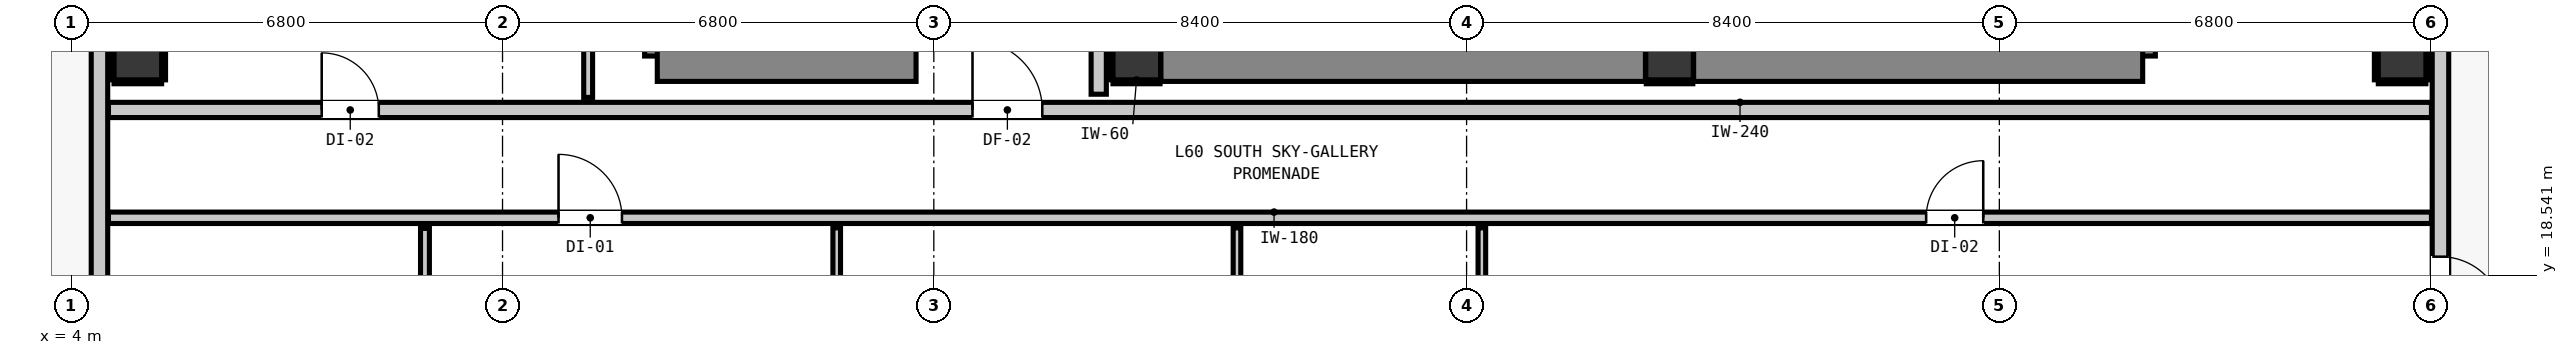
"""IFC4 building model, lengths in metres.
Left out: names, types, materials, properties, quantities, classifications, styles, units other than length and angle.
Written with IfcOpenShell. Run it as: python <this file> out.ifc"""

import sys

from ifc_helpers import new_model, si_unit, direction, frame, frame_2d, origin, origin_2d, place, context, subcontext, project, spatial, rectangle, extrude, element, fill, save


model = new_model("IFC4")
c1 = context("Model", 3, precision=1e-05, world=origin(), true_north=direction((0.0, 1.0)))
c2 = subcontext(c1, "Body", "Model", "MODEL_VIEW")
j1 = project(units=[si_unit("LENGTHUNIT", "METRE"), si_unit("PLANEANGLEUNIT", "RADIAN")], contexts=[c1])
p1 = place(None, origin())
s1 = spatial("IfcSite", under=j1, at=p1, CompositionType="ELEMENT")
p2 = place(p1, origin())
s2 = spatial("IfcBuilding", under=s1, at=p2, CompositionType="ELEMENT")
p3 = place(p2, frame((0.0, 0.0, 206.76)))
s3 = spatial("IfcBuildingStorey", under=s2, at=p3, CompositionType="ELEMENT", Elevation=206.76)
for number, where, z_axis, x_axis in (
    (1, (20.8, 22.0, 0.0), (0.0, 0.0, 1.0), (1.0, 0.0, 0.0)),
    (2, (29.2, 22.0, 0.0), (0.0, 0.0, 1.0), (1.0, 0.0, 0.0)),
):
    element("IfcColumn", number, at=place(p3, frame(where, z_axis=z_axis, x_axis=x_axis)), inside=s3, PredefinedType="COLUMN", context=c2, shape_type="SweptSolid", body=[
        extrude(rectangle(XDim=0.75, YDim=0.75, at=origin_2d()), origin(), (0.0, 0.0, 1.0), 3.32),
    ])
p4 = place(p3, frame((13.44, 22.0, 0.0), z_axis=(0.0, 0.0, 1.0), x_axis=(0.0, 1.0, 0.0)))
e3 = element("IfcWall", 3, at=p4, inside=s3, PredefinedType="SHEAR", context=c2, shape_type="SweptSolid", body=[
    extrude(rectangle(XDim=8.32, YDim=0.8, at=frame_2d((4.16, 0.0))), origin(), (0.0, 0.0, 1.0), 3.32),
])
p5 = place(p3, frame((13.24, 22.0, 0.0), z_axis=(0.0, 0.0, 1.0), x_axis=(1.0, 0.0, 0.0)))
e4 = element("IfcWall", 4, at=p5, inside=s3, PredefinedType="SHEAR", context=c2, shape_type="SweptSolid", body=[
    extrude(rectangle(XDim=4.08, YDim=0.8, at=frame_2d((2.04, 0.0))), origin(), (0.0, 0.0, 1.0), 3.32),
])
p6 = place(p3, frame((36.46, 22.0, 0.0), z_axis=(0.0, 0.0, 1.0), x_axis=(0.0, 1.0, 0.0)))
e5 = element("IfcWall", 5, at=p6, inside=s3, PredefinedType="SHEAR", context=c2, shape_type="SweptSolid", body=[
    extrude(rectangle(XDim=8.32, YDim=0.8, at=frame_2d((4.16, 0.0))), origin(), (0.0, 0.0, 1.0), 3.32),
])
p7 = place(p3, frame((29.58, 22.0, 0.0), z_axis=(0.0, 0.0, 1.0), x_axis=(1.0, 0.0, 0.0)))
e6 = element("IfcWall", 6, at=p7, inside=s3, PredefinedType="SHEAR", context=c2, shape_type="SweptSolid", body=[
    extrude(rectangle(XDim=7.08, YDim=0.8, at=frame_2d((3.54, 0.0))), origin(), (0.0, 0.0, 1.0), 3.32),
])
p8 = place(p3, frame((21.18, 22.0, 0.0), z_axis=(0.0, 0.0, 1.0), x_axis=(1.0, 0.0, 0.0)))
e7 = element("IfcWall", 7, at=p8, inside=s3, PredefinedType="SHEAR", context=c2, shape_type="SweptSolid", body=[
    extrude(rectangle(XDim=7.64, YDim=0.8, at=frame_2d((3.82, 0.0))), origin(), (0.0, 0.0, 1.0), 3.32),
])
for number, where, z_axis, x_axis in (
    (8, (5.05, 22.0, 0.0), (0.0, 0.0, 1.0), (1.0, 0.0, 0.0)),
    (9, (40.75, 22.0, 0.0), (0.0, 0.0, 1.0), (1.0, 0.0, 0.0)),
):
    element("IfcColumn", number, at=place(p3, frame(where, z_axis=z_axis, x_axis=x_axis)), inside=s3, PredefinedType="COLUMN", context=c2, shape_type="SweptSolid", body=[
        extrude(rectangle(XDim=0.75, YDim=0.75, at=origin_2d()), origin(), (0.0, 0.0, 1.0), 2.9),
    ])
p9 = place(p3, frame((4.445, 12.345, 0.0), z_axis=(0.0, 0.0, 1.0), x_axis=(0.0, 1.0, 0.0)))
e10 = element("IfcWall", 10, at=p9, inside=s3, PredefinedType="STANDARD", context=c2, shape_type="SweptSolid", body=[
    extrude(rectangle(XDim=30.31, YDim=0.26, at=frame_2d((15.155, 0.0))), origin(), (0.0, 0.0, 1.0), 2.9),
])
p10 = place(p9, frame((0.91, 0.0, 0.0)))
e11 = element("IfcOpeningElement", 11, at=p10, cuts=e10, PredefinedType="OPENING", context=c2, shape_type="SweptSolid", body=[
    extrude(rectangle(XDim=1.0, YDim=2.15, at=frame_2d((0.5, 1.075))), frame((0.0, 0.14, 0.0), z_axis=(0.0, -1.0, 0.0), x_axis=(1.0, 0.0, 0.0)), (0.0, 0.0, 1.0), 0.28),
])
p11 = place(p9, frame((2.322, 0.0, 0.85)))
e12 = element("IfcOpeningElement", 12, at=p11, cuts=e10, PredefinedType="OPENING", context=c2, shape_type="SweptSolid", body=[
    extrude(rectangle(XDim=0.58, YDim=1.5, at=frame_2d((0.29, 0.75))), frame((0.0, 0.14, 0.0), z_axis=(0.0, -1.0, 0.0), x_axis=(1.0, 0.0, 0.0)), (0.0, 0.0, 1.0), 0.28),
])
p12 = place(p9, frame((13.255, 0.0, 0.85)))
e13 = element("IfcOpeningElement", 13, at=p12, cuts=e10, PredefinedType="OPENING", context=c2, shape_type="SweptSolid", body=[
    extrude(rectangle(XDim=1.5, YDim=1.8, at=frame_2d((0.75, 0.9))), frame((0.0, 0.14, 0.0), z_axis=(0.0, -1.0, 0.0), x_axis=(1.0, 0.0, 0.0)), (0.0, 0.0, 1.0), 0.28),
])
p13 = place(p3, frame((41.355, 42.655, 0.0), z_axis=(0.0, 0.0, 1.0), x_axis=(0.0, -1.0, 0.0)))
e14 = element("IfcWall", 14, at=p13, inside=s3, PredefinedType="STANDARD", context=c2, shape_type="SweptSolid", body=[
    extrude(rectangle(XDim=30.31, YDim=0.26, at=frame_2d((15.155, 0.0))), origin(), (0.0, 0.0, 1.0), 2.9),
])
p14 = place(p13, frame((23.818, 0.0, 0.0)))
e15 = element("IfcOpeningElement", 15, at=p14, cuts=e14, PredefinedType="OPENING", context=c2, shape_type="SweptSolid", body=[
    extrude(rectangle(XDim=1.0, YDim=2.15, at=frame_2d((0.5, 1.075))), frame((0.0, 0.14, 0.0), z_axis=(0.0, -1.0, 0.0), x_axis=(1.0, 0.0, 0.0)), (0.0, 0.0, 1.0), 0.28),
])
p15 = place(p13, frame((26.869, 0.0, 0.85)))
e16 = element("IfcOpeningElement", 16, at=p15, cuts=e14, PredefinedType="OPENING", context=c2, shape_type="SweptSolid", body=[
    extrude(rectangle(XDim=1.5, YDim=1.8, at=frame_2d((0.75, 0.9))), frame((0.0, 0.14, 0.0), z_axis=(0.0, -1.0, 0.0), x_axis=(1.0, 0.0, 0.0)), (0.0, 0.0, 1.0), 0.28),
])
p16 = place(p3, frame((4.587, 21.15, 0.0), z_axis=(0.0, 0.0, 1.0), x_axis=(1.0, 0.0, 0.0)))
e17 = element("IfcWall", 17, at=p16, inside=s3, PredefinedType="PARTITIONING", context=c2, shape_type="SweptSolid", body=[
    extrude(rectangle(XDim=36.626, YDim=0.24, at=frame_2d((18.313, 0.0))), origin(), (0.0, 0.0, 1.0), 2.9),
])
p17 = place(p16, frame((13.623, 0.0, 0.0)))
e18 = element("IfcOpeningElement", 18, at=p17, cuts=e17, PredefinedType="OPENING", context=c2, shape_type="SweptSolid", body=[
    extrude(rectangle(XDim=1.1, YDim=2.15, at=frame_2d((0.55, 1.075))), frame((0.0, 0.13, 0.0), z_axis=(0.0, -1.0, 0.0), x_axis=(1.0, 0.0, 0.0)), (0.0, 0.0, 1.0), 0.26),
])
p18 = place(p16, frame((3.362, 0.0, 0.0)))
e19 = element("IfcOpeningElement", 19, at=p18, cuts=e17, PredefinedType="OPENING", context=c2, shape_type="SweptSolid", body=[
    extrude(rectangle(XDim=0.9, YDim=2.1, at=frame_2d((0.45, 1.05))), frame((0.0, 0.13, 0.0), z_axis=(0.0, -1.0, 0.0), x_axis=(1.0, 0.0, 0.0)), (0.0, 0.0, 1.0), 0.26),
])
p19 = place(p3, frame((4.587, 19.45, 0.0), z_axis=(0.0, 0.0, 1.0), x_axis=(1.0, 0.0, 0.0)))
e20 = element("IfcWall", 20, at=p19, inside=s3, PredefinedType="PARTITIONING", context=c2, shape_type="SweptSolid", body=[
    extrude(rectangle(XDim=36.626, YDim=0.18, at=frame_2d((18.313, 0.0))), origin(), (0.0, 0.0, 1.0), 2.9),
])
p20 = place(p19, frame((7.096, 0.0, 0.0)))
e21 = element("IfcOpeningElement", 21, at=p20, cuts=e20, PredefinedType="OPENING", context=c2, shape_type="SweptSolid", body=[
    extrude(rectangle(XDim=1.0, YDim=2.15, at=frame_2d((0.5, 1.075))), frame((0.0, 0.1, 0.0), z_axis=(0.0, -1.0, 0.0), x_axis=(1.0, 0.0, 0.0)), (0.0, 0.0, 1.0), 0.2),
])
p21 = place(p19, frame((28.659, 0.0, 0.0)))
e22 = element("IfcOpeningElement", 22, at=p21, cuts=e20, PredefinedType="OPENING", context=c2, shape_type="SweptSolid", body=[
    extrude(rectangle(XDim=0.9, YDim=2.1, at=frame_2d((0.45, 1.05))), frame((0.0, 0.1, 0.0), z_axis=(0.0, -1.0, 0.0), x_axis=(1.0, 0.0, 0.0)), (0.0, 0.0, 1.0), 0.2),
])
p22 = place(p3, frame((20.2, 21.398, 0.0), z_axis=(0.0, 0.0, 1.0), x_axis=(0.0, 1.0, 0.0)))
e23 = element("IfcWall", 23, at=p22, inside=s3, PredefinedType="PARTITIONING", context=c2, shape_type="SweptSolid", body=[
    extrude(rectangle(XDim=6.754, YDim=0.24, at=frame_2d((3.377, 0.0))), origin(), (0.0, 0.0, 1.0), 0.905),
])
p23 = place(p3, frame((9.577, 15.707, 0.0), z_axis=(0.0, 0.0, 1.0), x_axis=(0.0, 1.0, 0.0)))
e24 = element("IfcWall", 24, at=p23, inside=s3, PredefinedType="PARTITIONING", context=c2, shape_type="SweptSolid", body=[
    extrude(rectangle(XDim=3.575, YDim=0.14, at=frame_2d((1.788, 0.0))), origin(), (0.0, 0.0, 1.0), 2.9),
])
p24 = place(p23, frame((1.355, 0.0, 0.0)))
e25 = element("IfcOpeningElement", 25, at=p24, cuts=e24, PredefinedType="OPENING", context=c2, shape_type="SweptSolid", body=[
    extrude(rectangle(XDim=0.86, YDim=2.02, at=frame_2d((0.43, 1.01))), frame((0.0, 0.08, 0.0), z_axis=(0.0, -1.0, 0.0), x_axis=(1.0, 0.0, 0.0)), (0.0, 0.0, 1.0), 0.16),
])
p25 = place(p3, frame((12.15, 21.348, 0.0), z_axis=(0.0, 0.0, 1.0), x_axis=(0.0, 1.0, 0.0)))
e26 = element("IfcWall", 26, at=p25, inside=s3, PredefinedType="PARTITIONING", context=c2, shape_type="SweptSolid", body=[
    extrude(rectangle(XDim=13.004, YDim=0.14, at=frame_2d((6.502, 0.0))), origin(), (0.0, 0.0, 1.0), 2.9),
])
p26 = place(p3, frame((16.069, 15.697, 0.0), z_axis=(0.0, 0.0, 1.0), x_axis=(0.0, 1.0, 0.0)))
e27 = element("IfcWall", 27, at=p26, inside=s3, PredefinedType="PARTITIONING", context=c2, shape_type="SweptSolid", body=[
    extrude(rectangle(XDim=3.595, YDim=0.12, at=frame_2d((1.797, 0.0))), origin(), (0.0, 0.0, 1.0), 2.9),
])
p27 = place(p26, frame((1.345, 0.0, 0.0)))
e28 = element("IfcOpeningElement", 28, at=p27, cuts=e27, PredefinedType="OPENING", context=c2, shape_type="SweptSolid", body=[
    extrude(rectangle(XDim=0.9, YDim=2.1, at=frame_2d((0.45, 1.05))), frame((0.0, 0.07, 0.0), z_axis=(0.0, -1.0, 0.0), x_axis=(1.0, 0.0, 0.0)), (0.0, 0.0, 1.0), 0.14),
])
p28 = place(p3, frame((22.38, 15.697, 0.0), z_axis=(0.0, 0.0, 1.0), x_axis=(0.0, 1.0, 0.0)))
e29 = element("IfcWall", 29, at=p28, inside=s3, PredefinedType="PARTITIONING", context=c2, shape_type="SweptSolid", body=[
    extrude(rectangle(XDim=3.595, YDim=0.12, at=frame_2d((1.797, 0.0))), origin(), (0.0, 0.0, 1.0), 2.9),
])
p29 = place(p28, frame((1.358, 0.0, 0.0)))
e30 = element("IfcOpeningElement", 30, at=p29, cuts=e29, PredefinedType="OPENING", context=c2, shape_type="SweptSolid", body=[
    extrude(rectangle(XDim=0.9, YDim=2.1, at=frame_2d((0.45, 1.05))), frame((0.0, 0.07, 0.0), z_axis=(0.0, -1.0, 0.0), x_axis=(1.0, 0.0, 0.0)), (0.0, 0.0, 1.0), 0.14),
])
p30 = place(p3, frame((26.241, 15.697, 0.0), z_axis=(0.0, 0.0, 1.0), x_axis=(0.0, 1.0, 0.0)))
e31 = element("IfcWall", 31, at=p30, inside=s3, PredefinedType="PARTITIONING", context=c2, shape_type="SweptSolid", body=[
    extrude(rectangle(XDim=3.595, YDim=0.12, at=frame_2d((1.797, 0.0))), origin(), (0.0, 0.0, 1.0), 2.9),
])
p31 = place(p3, frame((20.425, 21.593, 0.0), z_axis=(0.0, 0.0, 1.0), x_axis=(1.0, 0.0, 0.0)))
e32 = element("IfcWall", 32, at=p31, inside=s3, PredefinedType="PARTITIONING", context=c2, shape_type="SweptSolid", body=[
    extrude(rectangle(XDim=0.742, YDim=0.06, at=frame_2d((0.371, 0.0))), origin(), (0.0, 0.0, 1.0), 0.905),
])
p32 = place(p3, frame((20.393, 21.625, 0.0), z_axis=(0.0, 0.0, 1.0), x_axis=(0.0, 1.0, 0.0)))
e33 = element("IfcWall", 33, at=p32, inside=s3, PredefinedType="PARTITIONING", context=c2, shape_type="SweptSolid", body=[
    extrude(rectangle(XDim=0.75, YDim=0.06, at=frame_2d((0.375, 0.0))), origin(), (0.0, 0.0, 1.0), 0.905),
])
p33 = place(p3, frame((28.833, 21.593, 0.0), z_axis=(0.0, 0.0, 1.0), x_axis=(1.0, 0.0, 0.0)))
e34 = element("IfcWall", 34, at=p33, inside=s3, PredefinedType="PARTITIONING", context=c2, shape_type="SweptSolid", body=[
    extrude(rectangle(XDim=0.734, YDim=0.06, at=frame_2d((0.367, 0.0))), origin(), (0.0, 0.0, 1.0), 0.905),
])
p34 = place(p3, frame((4.675, 21.593, 0.0), z_axis=(0.0, 0.0, 1.0), x_axis=(1.0, 0.0, 0.0)))
e35 = element("IfcWall", 35, at=p34, inside=s3, PredefinedType="PARTITIONING", context=c2, shape_type="SweptSolid", body=[
    extrude(rectangle(XDim=0.75, YDim=0.06, at=frame_2d((0.375, 0.0))), origin(), (0.0, 0.0, 1.0), 0.905),
])
for number, where, z_axis, x_axis in (
    (36, (4.643, 21.625, 0.0), (0.0, 0.0, 1.0), (0.0, 1.0, 0.0)),
    (37, (5.457, 21.625, 0.0), (0.0, 0.0, 1.0), (0.0, 1.0, 0.0)),
):
    element("IfcWall", number, at=place(p3, frame(where, z_axis=z_axis, x_axis=x_axis)), inside=s3, PredefinedType="PARTITIONING", context=c2, shape_type="SweptSolid", body=[
        extrude(rectangle(XDim=0.75, YDim=0.06, at=frame_2d((0.375, 0.0))), origin(), (0.0, 0.0, 1.0), 1.45),
    ])
p35 = place(p3, frame((40.375, 21.593, 0.0), z_axis=(0.0, 0.0, 1.0), x_axis=(1.0, 0.0, 0.0)))
e38 = element("IfcWall", 38, at=p35, inside=s3, PredefinedType="PARTITIONING", context=c2, shape_type="SweptSolid", body=[
    extrude(rectangle(XDim=0.75, YDim=0.06, at=frame_2d((0.375, 0.0))), origin(), (0.0, 0.0, 1.0), 0.905),
])
for number, where, z_axis, x_axis in (
    (39, (40.343, 21.625, 0.0), (0.0, 0.0, 1.0), (0.0, 1.0, 0.0)),
    (40, (41.157, 21.625, 0.0), (0.0, 0.0, 1.0), (0.0, 1.0, 0.0)),
):
    element("IfcWall", number, at=place(p3, frame(where, z_axis=z_axis, x_axis=x_axis)), inside=s3, PredefinedType="PARTITIONING", context=c2, shape_type="SweptSolid", body=[
        extrude(rectangle(XDim=0.75, YDim=0.06, at=frame_2d((0.375, 0.0))), origin(), (0.0, 0.0, 1.0), 1.45),
    ])
p36 = place(p14, origin())
e41 = element("IfcDoor", 41, at=p36, inside=s3, OperationType="SINGLE_SWING_RIGHT", PredefinedType="DOOR", context=c2, shape_type="SweptSolid", body=[
    extrude(rectangle(XDim=1.0, YDim=2.15, at=frame_2d((0.5, 1.075))), frame((0.0, 0.025, 0.0), z_axis=(0.0, -1.0, 0.0), x_axis=(1.0, 0.0, 0.0)), (0.0, 0.0, 1.0), 0.05),
])
fill(e15, e41)
p37 = place(p17, origin())
e42 = element("IfcDoor", 42, at=p37, inside=s3, OperationType="SINGLE_SWING_LEFT", PredefinedType="DOOR", context=c2, shape_type="SweptSolid", body=[
    extrude(rectangle(XDim=1.1, YDim=2.15, at=frame_2d((0.55, 1.075))), frame((0.0, 0.025, 0.0), z_axis=(0.0, -1.0, 0.0), x_axis=(1.0, 0.0, 0.0)), (0.0, 0.0, 1.0), 0.05),
])
fill(e18, e42)
p38 = place(p20, origin())
e43 = element("IfcDoor", 43, at=p38, inside=s3, OperationType="SINGLE_SWING_LEFT", PredefinedType="DOOR", context=c2, shape_type="SweptSolid", body=[
    extrude(rectangle(XDim=1.0, YDim=2.15, at=frame_2d((0.5, 1.075))), frame((0.0, 0.025, 0.0), z_axis=(0.0, -1.0, 0.0), x_axis=(1.0, 0.0, 0.0)), (0.0, 0.0, 1.0), 0.05),
])
fill(e21, e43)
p39 = place(p21, origin())
e44 = element("IfcDoor", 44, at=p39, inside=s3, OperationType="SINGLE_SWING_RIGHT", PredefinedType="DOOR", context=c2, shape_type="SweptSolid", body=[
    extrude(rectangle(XDim=0.9, YDim=2.1, at=frame_2d((0.45, 1.05))), frame((0.0, 0.025, 0.0), z_axis=(0.0, -1.0, 0.0), x_axis=(1.0, 0.0, 0.0)), (0.0, 0.0, 1.0), 0.05),
])
fill(e22, e44)
p40 = place(p18, origin())
e45 = element("IfcDoor", 45, at=p40, inside=s3, OperationType="SINGLE_SWING_LEFT", PredefinedType="DOOR", context=c2, shape_type="SweptSolid", body=[
    extrude(rectangle(XDim=0.9, YDim=2.1, at=frame_2d((0.45, 1.05))), frame((0.0, 0.025, 0.0), z_axis=(0.0, -1.0, 0.0), x_axis=(1.0, 0.0, 0.0)), (0.0, 0.0, 1.0), 0.05),
])
fill(e19, e45)
save(model, sys.argv[1])
